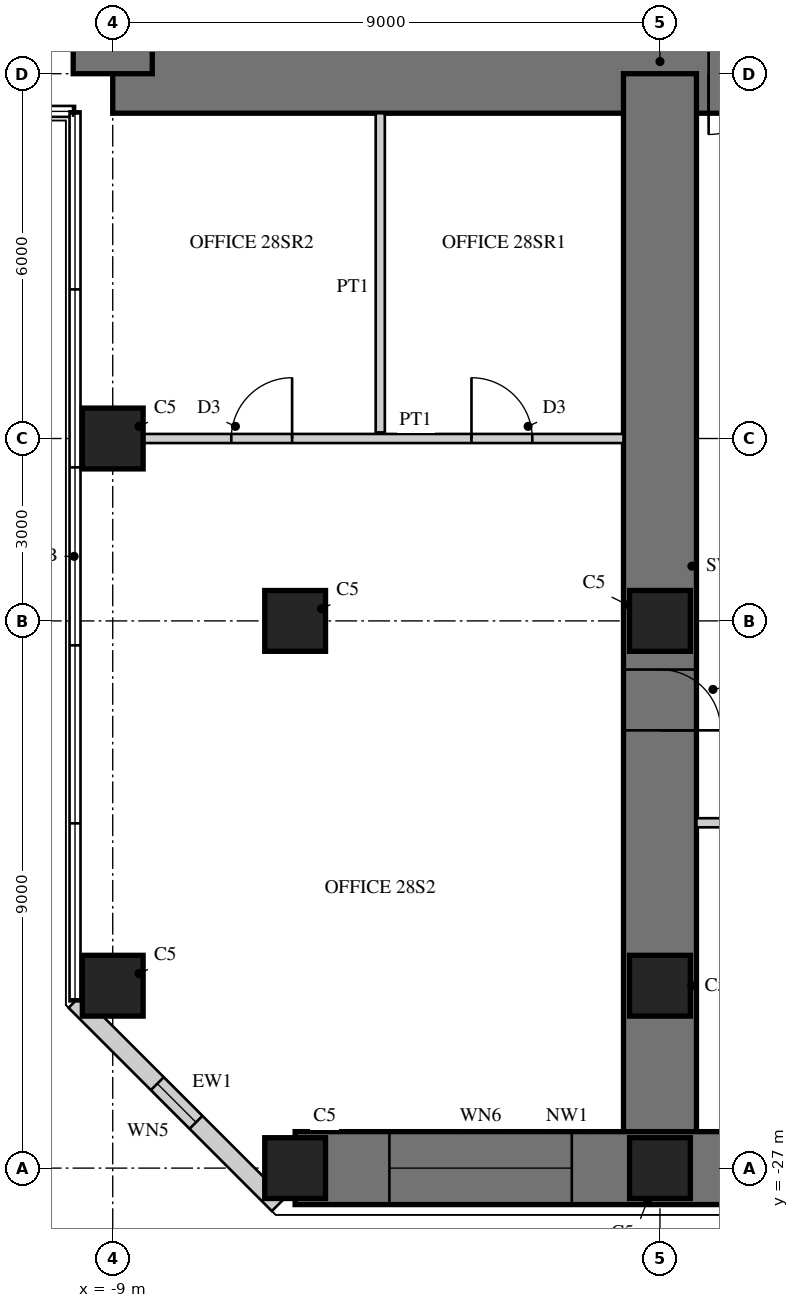
"""IFC4 building model, lengths in metres.
Left out: names, types, materials, properties, quantities, classifications, styles, units other than length and angle.
Written with IfcOpenShell. Run it as: python <this file> out.ifc"""

import sys

from ifc_helpers import new_model, si_unit, direction, frame, frame_2d, origin, origin_2d, place, context, subcontext, project, spatial, rectangle, hollow_rectangle, extrude, element, fill, save


model = new_model("IFC4")
c1 = context("Model", 3, precision=1e-05, world=origin(), true_north=direction((0.0, 1.0)))
c2 = subcontext(c1, "Body", "Model", "MODEL_VIEW")
j1 = project(units=[si_unit("LENGTHUNIT", "METRE"), si_unit("PLANEANGLEUNIT", "RADIAN")], contexts=[c1])
p1 = place(None, origin())
s1 = spatial("IfcSite", under=j1, at=p1, CompositionType="ELEMENT")
p2 = place(p1, origin())
s2 = spatial("IfcBuilding", under=s1, at=p2, CompositionType="ELEMENT")
p3 = place(p2, frame((0.0, 0.0, 116.5)))
s3 = spatial("IfcBuildingStorey", under=s2, at=p3, CompositionType="ELEMENT", Elevation=116.5)
p4 = place(p3, frame((-9.0, -9.0, 0.0), z_axis=(0.0, 0.0, 1.0), x_axis=(1.0, 0.0, 0.0)))
e1 = element("IfcWall", 1, at=p4, inside=s3, PredefinedType="SHEAR", context=c2, shape_type="SweptSolid", body=[
    extrude(rectangle(XDim=18.0, YDim=1.3, at=frame_2d((9.0, 0.0))), origin(), (0.0, 0.0, 1.0), 4.0),
])
p5 = place(p4, frame((9.8, 0.0, 0.0)))
e2 = element("IfcOpeningElement", 2, at=p5, cuts=e1, PredefinedType="OPENING", context=c2, shape_type="SweptSolid", body=[
    extrude(rectangle(XDim=1.0, YDim=2.4, at=frame_2d((0.5, 1.2))), frame((0.0, 0.66, 0.0), z_axis=(0.0, -1.0, 0.0), x_axis=(1.0, 0.0, 0.0)), (0.0, 0.0, 1.0), 1.32),
])
p6 = place(p3, frame((-9.0, 9.0, 0.0), z_axis=(0.0, 0.0, 1.0), x_axis=(0.0, -1.0, 0.0)))
e3 = element("IfcWall", 3, at=p6, inside=s3, PredefinedType="SHEAR", context=c2, shape_type="SweptSolid", body=[
    extrude(rectangle(XDim=18.0, YDim=1.3, at=frame_2d((9.0, 0.0))), origin(), (0.0, 0.0, 1.0), 4.0),
])
p7 = place(p6, frame((9.8, 0.0, 0.0)))
e4 = element("IfcOpeningElement", 4, at=p7, cuts=e3, PredefinedType="OPENING", context=c2, shape_type="SweptSolid", body=[
    extrude(rectangle(XDim=1.0, YDim=2.4, at=frame_2d((0.5, 1.2))), frame((0.0, 0.66, 0.0), z_axis=(0.0, -1.0, 0.0), x_axis=(1.0, 0.0, 0.0)), (0.0, 0.0, 1.0), 1.32),
])
p8 = place(p3, frame((0.0, -9.0, 0.0), z_axis=(0.0, 0.0, 1.0), x_axis=(0.0, -1.0, 0.0)))
e5 = element("IfcWall", 5, at=p8, inside=s3, PredefinedType="SHEAR", context=c2, shape_type="SweptSolid", body=[
    extrude(rectangle(XDim=18.0, YDim=1.2, at=frame_2d((9.0, 0.0))), origin(), (0.0, 0.0, 1.0), 4.0),
])
p9 = place(p8, frame((9.8, 0.0, 0.0)))
e6 = element("IfcOpeningElement", 6, at=p9, cuts=e5, PredefinedType="OPENING", context=c2, shape_type="SweptSolid", body=[
    extrude(rectangle(XDim=1.0, YDim=2.2, at=frame_2d((0.5, 1.1))), frame((0.0, 0.61, 0.0), z_axis=(0.0, -1.0, 0.0), x_axis=(1.0, 0.0, 0.0)), (0.0, 0.0, 1.0), 1.22),
])
p10 = place(p3, frame((-6.0, -27.0, 0.0), z_axis=(0.0, 0.0, 1.0), x_axis=(1.0, 0.0, 0.0)))
e7 = element("IfcWall", 7, at=p10, inside=s3, PredefinedType="SHEAR", context=c2, shape_type="SweptSolid", body=[
    extrude(rectangle(XDim=12.0, YDim=1.2, at=frame_2d((6.0, 0.0))), origin(), (0.0, 0.0, 1.0), 4.0),
])
p11 = place(p10, frame((1.55, 0.0, 0.6)))
e8 = element("IfcOpeningElement", 8, at=p11, cuts=e7, PredefinedType="OPENING", context=c2, shape_type="SweptSolid", body=[
    extrude(rectangle(XDim=3.0, YDim=2.4, at=frame_2d((1.5, 1.2))), frame((0.0, 0.61, 0.0), z_axis=(0.0, -1.0, 0.0), x_axis=(1.0, 0.0, 0.0)), (0.0, 0.0, 1.0), 1.22),
])
p12 = place(p10, frame((7.45, 0.0, 0.6)))
e9 = element("IfcOpeningElement", 9, at=p12, cuts=e7, PredefinedType="OPENING", context=c2, shape_type="SweptSolid", body=[
    extrude(rectangle(XDim=3.0, YDim=2.4, at=frame_2d((1.5, 1.2))), frame((0.0, 0.61, 0.0), z_axis=(0.0, -1.0, 0.0), x_axis=(1.0, 0.0, 0.0)), (0.0, 0.0, 1.0), 1.22),
])
for number, where, z_axis, x_axis in (
    (10, (-9.0, -15.0, 0.0), (0.0, 0.0, 1.0), (1.0, 0.0, 0.0)),
    (11, (-9.0, -24.0, 0.0), (0.0, 0.0, 1.0), (1.0, 0.0, 0.0)),
    (12, (-6.0, -27.0, 0.0), (0.0, 0.0, 1.0), (1.0, 0.0, 0.0)),
    (13, (0.0, -27.0, 0.0), (0.0, 0.0, 1.0), (1.0, 0.0, 0.0)),
    (14, (-6.0, -18.0, 0.0), (0.0, 0.0, 1.0), (1.0, 0.0, 0.0)),
    (15, (0.0, -18.0, 0.0), (0.0, 0.0, 1.0), (1.0, 0.0, 0.0)),
    (16, (0.0, -24.0, 0.0), (0.0, 0.0, 1.0), (1.0, 0.0, 0.0)),
):
    element("IfcColumn", number, at=place(p3, frame(where, z_axis=z_axis, x_axis=x_axis)), inside=s3, PredefinedType="COLUMN", context=c2, shape_type="SweptSolid", body=[
        extrude(rectangle(XDim=1.0, YDim=1.0, at=origin_2d()), origin(), (0.0, 0.0, 1.0), 4.0),
    ])
p13 = place(p3, frame((-9.62, -24.257, 0.0), z_axis=(0.0, 0.0, 1.0), x_axis=(0.707106781187, -0.707106781187, 0.0)))
e17 = element("IfcWall", 17, at=p13, inside=s3, PredefinedType="SOLIDWALL", context=c2, shape_type="SweptSolid", body=[
    extrude(rectangle(XDim=4.728, YDim=0.3, at=frame_2d((2.364, 0.0))), origin(), (0.0, 0.0, 1.0), 3.8),
])
p14 = place(p13, frame((1.914, 0.0, 0.3)))
e18 = element("IfcOpeningElement", 18, at=p14, cuts=e17, PredefinedType="OPENING", context=c2, shape_type="SweptSolid", body=[
    extrude(rectangle(XDim=0.9, YDim=2.4, at=frame_2d((0.45, 1.2))), frame((0.0, 0.16, 0.0), z_axis=(0.0, -1.0, 0.0), x_axis=(1.0, 0.0, 0.0)), (0.0, 0.0, 1.0), 0.32),
])
p15 = place(p3, frame((-8.5, -15.0, 0.0), z_axis=(0.0, 0.0, 1.0), x_axis=(1.0, 0.0, 0.0)))
e19 = element("IfcWall", 19, at=p15, inside=s3, PredefinedType="PARTITIONING", context=c2, shape_type="SweptSolid", body=[
    extrude(rectangle(XDim=7.9, YDim=0.15, at=frame_2d((3.95, 0.0))), origin(), (0.0, 0.0, 1.0), 3.0),
])
p16 = place(p15, frame((1.45, 0.0, 0.0)))
e20 = element("IfcOpeningElement", 20, at=p16, cuts=e19, PredefinedType="OPENING", context=c2, shape_type="SweptSolid", body=[
    extrude(rectangle(XDim=1.0, YDim=2.1, at=frame_2d((0.5, 1.05))), frame((0.0, 0.085, 0.0), z_axis=(0.0, -1.0, 0.0), x_axis=(1.0, 0.0, 0.0)), (0.0, 0.0, 1.0), 0.17),
])
p17 = place(p15, frame((5.4, 0.0, 0.0)))
e21 = element("IfcOpeningElement", 21, at=p17, cuts=e19, PredefinedType="OPENING", context=c2, shape_type="SweptSolid", body=[
    extrude(rectangle(XDim=1.0, YDim=2.1, at=frame_2d((0.5, 1.05))), frame((0.0, 0.085, 0.0), z_axis=(0.0, -1.0, 0.0), x_axis=(1.0, 0.0, 0.0)), (0.0, 0.0, 1.0), 0.17),
])
p18 = place(p3, frame((-4.6, -9.65, 0.0), z_axis=(0.0, 0.0, 1.0), x_axis=(0.0, -1.0, 0.0)))
e22 = element("IfcWall", 22, at=p18, inside=s3, PredefinedType="PARTITIONING", context=c2, shape_type="SweptSolid", body=[
    extrude(rectangle(XDim=5.25, YDim=0.15, at=frame_2d((2.625, 0.0))), origin(), (0.0, 0.0, 1.0), 3.8),
])
p19 = place(p3, frame((0.6, -21.32, 0.0), z_axis=(0.0, 0.0, 1.0), x_axis=(1.0, 0.0, 0.0)))
e23 = element("IfcWall", 23, at=p19, inside=s3, PredefinedType="PARTITIONING", context=c2, shape_type="SweptSolid", body=[
    extrude(rectangle(XDim=8.98, YDim=0.15, at=frame_2d((4.49, 0.0))), origin(), (0.0, 0.0, 1.0), 3.8),
])
p20 = place(p19, frame((0.45, 0.0, 0.0)))
e24 = element("IfcOpeningElement", 24, at=p20, cuts=e23, PredefinedType="OPENING", context=c2, shape_type="SweptSolid", body=[
    extrude(rectangle(XDim=1.0, YDim=2.2, at=frame_2d((0.5, 1.1))), frame((0.0, 0.085, 0.0), z_axis=(0.0, -1.0, 0.0), x_axis=(1.0, 0.0, 0.0)), (0.0, 0.0, 1.0), 0.17),
])
p21 = place(p14, origin())
e25 = element("IfcWindow", 25, at=p21, inside=s3, PartitioningType="SINGLE_PANEL", PredefinedType="WINDOW", context=c2, shape_type="SweptSolid", body=[
    extrude(hollow_rectangle(XDim=0.9, YDim=2.4, WallThickness=0.06, at=frame_2d((0.45, 1.2))), frame((0.0, 0.03, 0.0), z_axis=(0.0, -1.0, 0.0), x_axis=(1.0, 0.0, 0.0)), (0.0, 0.0, 1.0), 0.06),
    extrude(rectangle(XDim=0.779, YDim=2.279, at=frame_2d((0.45, 1.2))), frame((0.0, 0.03, 0.0), z_axis=(0.0, -1.0, 0.0), x_axis=(1.0, 0.0, 0.0)), (0.0, 0.0, 1.0), 0.06),
])
fill(e18, e25)
p22 = place(p11, origin())
e26 = element("IfcWindow", 26, at=p22, inside=s3, PartitioningType="SINGLE_PANEL", PredefinedType="WINDOW", context=c2, shape_type="SweptSolid", body=[
    extrude(hollow_rectangle(XDim=3.0, YDim=2.4, WallThickness=0.06, at=frame_2d((1.5, 1.2))), frame((0.0, 0.03, 0.0), z_axis=(0.0, -1.0, 0.0), x_axis=(1.0, 0.0, 0.0)), (0.0, 0.0, 1.0), 0.06),
    extrude(rectangle(XDim=2.879, YDim=2.279, at=frame_2d((1.5, 1.2))), frame((0.0, 0.03, 0.0), z_axis=(0.0, -1.0, 0.0), x_axis=(1.0, 0.0, 0.0)), (0.0, 0.0, 1.0), 0.06),
])
fill(e8, e26)
p23 = place(p16, origin())
e27 = element("IfcDoor", 27, at=p23, inside=s3, OperationType="SINGLE_SWING_RIGHT", PredefinedType="DOOR", context=c2, shape_type="SweptSolid", body=[
    extrude(rectangle(XDim=1.0, YDim=2.1, at=frame_2d((0.5, 1.05))), frame((0.0, 0.025, 0.0), z_axis=(0.0, -1.0, 0.0), x_axis=(1.0, 0.0, 0.0)), (0.0, 0.0, 1.0), 0.05),
])
fill(e20, e27)
p24 = place(p17, origin())
e28 = element("IfcDoor", 28, at=p24, inside=s3, OperationType="SINGLE_SWING_LEFT", PredefinedType="DOOR", context=c2, shape_type="SweptSolid", body=[
    extrude(rectangle(XDim=1.0, YDim=2.1, at=frame_2d((0.5, 1.05))), frame((0.0, 0.025, 0.0), z_axis=(0.0, -1.0, 0.0), x_axis=(1.0, 0.0, 0.0)), (0.0, 0.0, 1.0), 0.05),
])
fill(e21, e28)
p25 = place(p9, origin())
e29 = element("IfcDoor", 29, at=p25, inside=s3, OperationType="SINGLE_SWING_RIGHT", PredefinedType="DOOR", context=c2, shape_type="SweptSolid", body=[
    extrude(rectangle(XDim=1.0, YDim=2.2, at=frame_2d((0.5, 1.1))), frame((0.0, 0.025, 0.0), z_axis=(0.0, -1.0, 0.0), x_axis=(1.0, 0.0, 0.0)), (0.0, 0.0, 1.0), 0.05),
])
fill(e6, e29)
p26 = place(p5, frame((1.0, 0.0, 0.0), z_axis=(0.0, 0.0, 1.0), x_axis=(-1.0, 0.0, 0.0)))
e30 = element("IfcDoor", 30, at=p26, inside=s3, OperationType="SINGLE_SWING_RIGHT", PredefinedType="DOOR", context=c2, shape_type="SweptSolid", body=[
    extrude(rectangle(XDim=1.0, YDim=2.4, at=frame_2d((0.5, 1.2))), frame((0.0, -0.005, 0.0), z_axis=(0.0, -1.0, 0.0), x_axis=(1.0, 0.0, 0.0)), (0.0, 0.0, 1.0), 0.05),
])
fill(e2, e30)
save(model, sys.argv[1])
